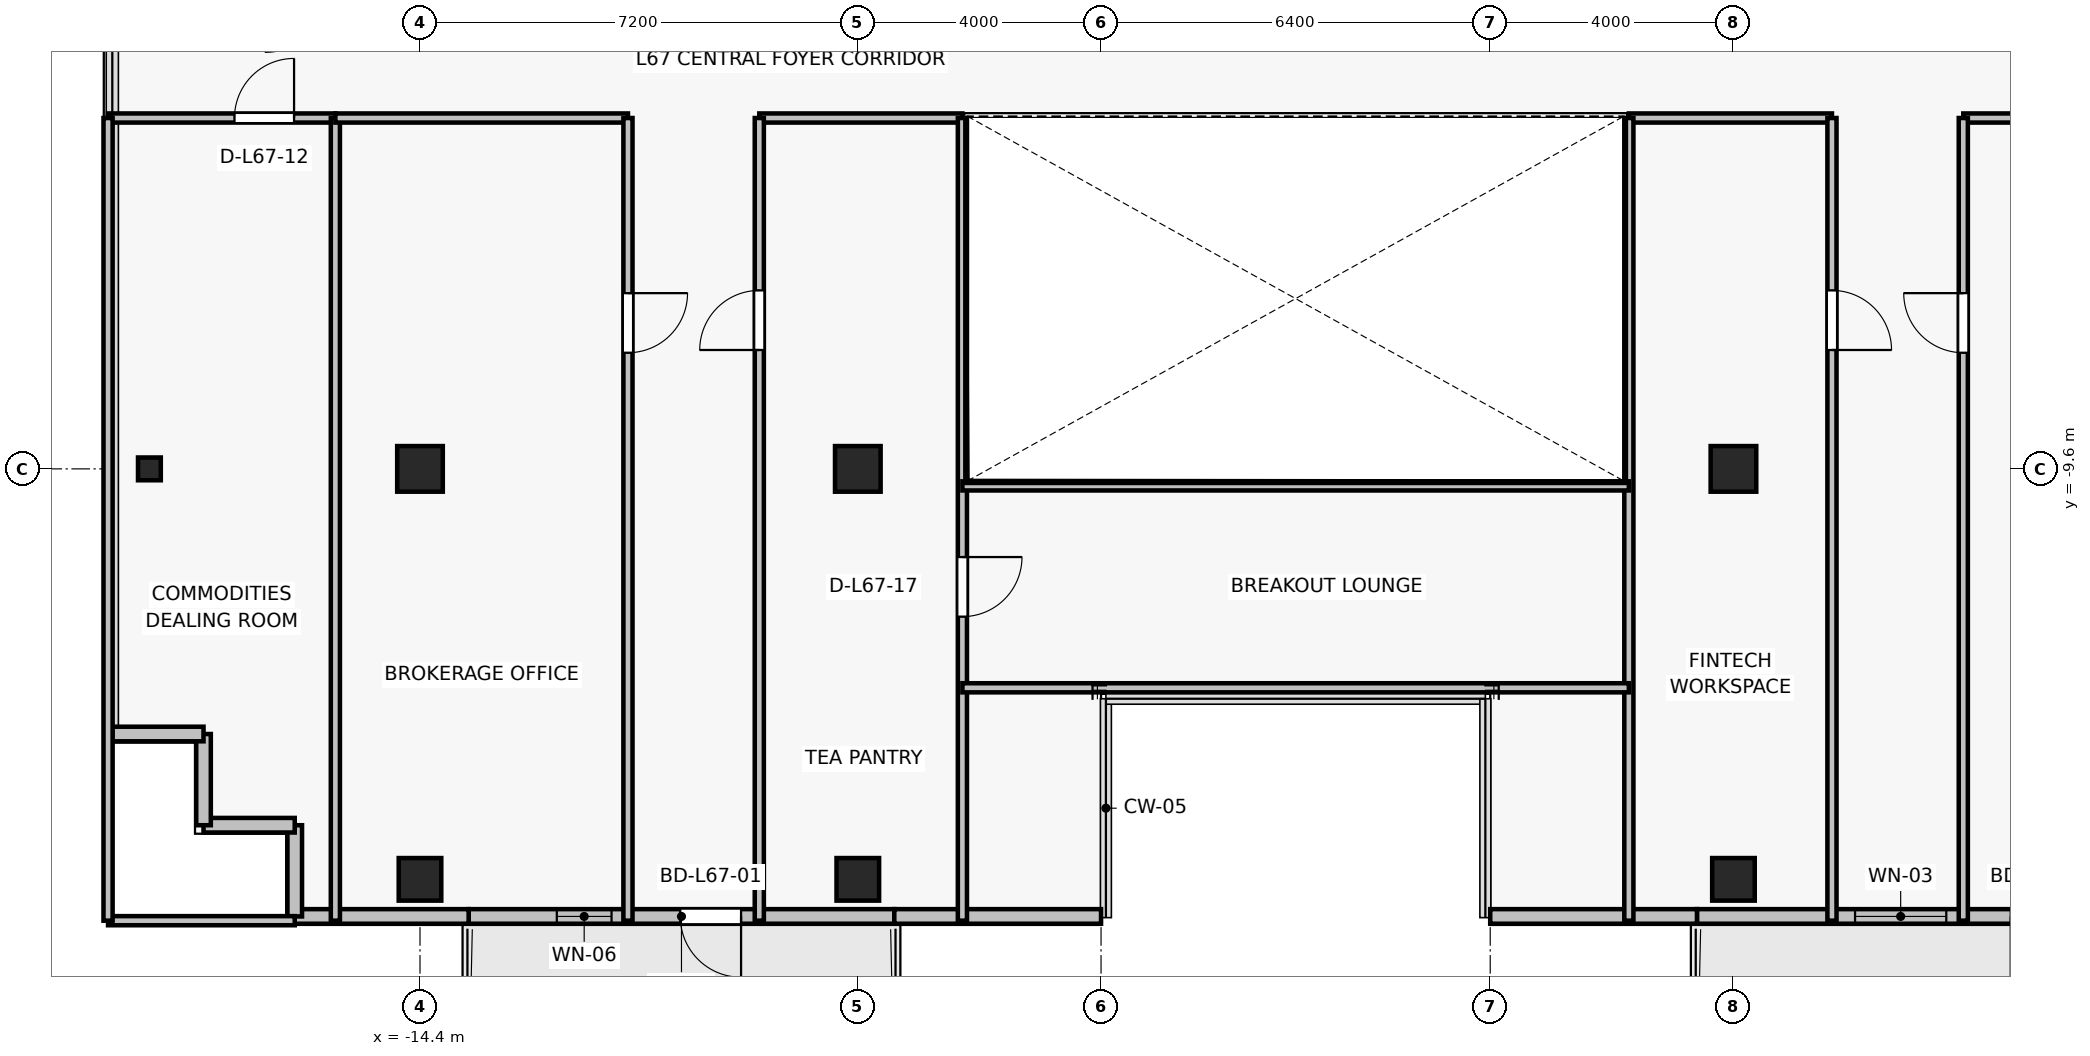
"""IFC4 building model, lengths in metres.
Left out: names, types, materials, properties, quantities, classifications, styles, units other than length and angle.
Written with IfcOpenShell. Run it as: python <this file> out.ifc"""

import sys

from ifc_helpers import new_model, si_unit, direction, frame, frame_2d, origin, origin_2d, place, context, subcontext, project, spatial, rectangle, i_section, extrude, source, transform, mapped, element, fill, save


model = new_model("IFC4")
c1 = context("Model", 3, precision=1e-05, world=origin(), true_north=direction((0.0, 1.0)))
c2 = subcontext(c1, "Body", "Model", "MODEL_VIEW")
j1 = project(units=[si_unit("LENGTHUNIT", "METRE"), si_unit("PLANEANGLEUNIT", "RADIAN")], contexts=[c1])
p1 = place(None, origin())
s1 = spatial("IfcSite", under=j1, at=p1, CompositionType="ELEMENT")
p2 = place(p1, origin())
s2 = spatial("IfcBuilding", under=s1, at=p2, CompositionType="ELEMENT")
p3 = place(p2, frame((0.0, 0.0, 238.6)))
s3 = spatial("IfcBuildingStorey", under=s2, at=p3, CompositionType="ELEMENT", Elevation=238.6)
for number, where, z_axis, x_axis in (
    (1, (-14.4, -9.6, 0.0), (0.0, 0.0, 1.0), (1.0, 0.0, 0.0)),
    (2, (-7.2, -9.6, 0.0), (0.0, 0.0, 1.0), (1.0, 0.0, 0.0)),
    (3, (7.2, -9.6, 0.0), (0.0, 0.0, 1.0), (1.0, 0.0, 0.0)),
):
    element("IfcColumn", number, at=place(p3, frame(where, z_axis=z_axis, x_axis=x_axis)), inside=s3, PredefinedType="COLUMN", context=c2, shape_type="SweptSolid", body=[
        extrude(rectangle(XDim=0.75, YDim=0.75, at=origin_2d()), origin(), (0.0, 0.0, 1.0), 3.3),
    ])
for number, where, z_axis, x_axis in (
    (4, (-14.4, -16.35, 0.0), (0.0, 0.0, 1.0), (1.0, 0.0, 0.0)),
    (5, (-7.2, -16.35, 0.0), (0.0, 0.0, 1.0), (1.0, 0.0, 0.0)),
    (6, (7.2, -16.35, 0.0), (0.0, 0.0, 1.0), (1.0, 0.0, 0.0)),
):
    element("IfcColumn", number, at=place(p3, frame(where, z_axis=z_axis, x_axis=x_axis)), inside=s3, PredefinedType="COLUMN", context=c2, shape_type="SweptSolid", body=[
        extrude(rectangle(XDim=0.7, YDim=0.7, at=origin_2d()), origin(), (0.0, 0.0, 1.0), 3.3),
    ])
p4 = place(p3, frame((-18.85, -9.6, 0.0), z_axis=(0.0, 0.0, 1.0), x_axis=(1.0, 0.0, 0.0)))
e7 = element("IfcColumn", 7, at=p4, inside=s3, PredefinedType="COLUMN", context=c2, shape_type="SweptSolid", body=[
    extrude(i_section(OverallWidth=0.375, OverallDepth=0.375, WebThickness=0.017, FlangeThickness=0.027, FilletRadius=0.015, at=origin_2d()), origin(), (0.0, 0.0, 1.0), 3.3),
])
p5 = place(p3, frame((-6.6, -16.96, 0.0), z_axis=(0.0, 0.0, 1.0), x_axis=(-1.0, 0.0, 0.0)))
e8 = element("IfcWall", 8, at=p5, inside=s3, PredefinedType="SOLIDWALL", context=c2, shape_type="SweptSolid", body=[
    extrude(rectangle(XDim=7.0, YDim=0.24, at=frame_2d((3.5, 0.0))), origin(), (0.0, 0.0, 1.0), 2.665),
])
p6 = place(p5, frame((2.52, 0.0, 0.0)))
e9 = element("IfcOpeningElement", 9, at=p6, cuts=e8, PredefinedType="OPENING", context=c2, shape_type="SweptSolid", body=[
    extrude(rectangle(XDim=1.0, YDim=2.2, at=frame_2d((0.5, 1.1))), frame((0.0, 0.13, 0.0), z_axis=(0.0, -1.0, 0.0), x_axis=(1.0, 0.0, 0.0)), (0.0, 0.0, 1.0), 0.26),
])
p7 = place(p5, frame((4.65, 0.0, 0.85)))
e10 = element("IfcOpeningElement", 10, at=p7, cuts=e8, PredefinedType="OPENING", context=c2, shape_type="SweptSolid", body=[
    extrude(rectangle(XDim=0.9, YDim=1.35, at=frame_2d((0.45, 0.675))), frame((0.0, 0.13, 0.0), z_axis=(0.0, -1.0, 0.0), x_axis=(1.0, 0.0, 0.0)), (0.0, 0.0, 1.0), 0.26),
])
p8 = place(p3, frame((13.6, -16.96, 0.0), z_axis=(0.0, 0.0, 1.0), x_axis=(-1.0, 0.0, 0.0)))
e11 = element("IfcWall", 11, at=p8, inside=s3, PredefinedType="SOLIDWALL", context=c2, shape_type="SweptSolid", body=[
    extrude(rectangle(XDim=7.0, YDim=0.24, at=frame_2d((3.5, 0.0))), origin(), (0.0, 0.0, 1.0), 2.665),
])
p9 = place(p8, frame((0.84, 0.0, 0.0)))
e12 = element("IfcOpeningElement", 12, at=p9, cuts=e11, PredefinedType="OPENING", context=c2, shape_type="SweptSolid", body=[
    extrude(rectangle(XDim=1.0, YDim=2.2, at=frame_2d((0.5, 1.1))), frame((0.0, 0.13, 0.0), z_axis=(0.0, -1.0, 0.0), x_axis=(1.0, 0.0, 0.0)), (0.0, 0.0, 1.0), 0.26),
])
p10 = place(p8, frame((2.9, 0.0, 0.85)))
e13 = element("IfcOpeningElement", 13, at=p10, cuts=e11, PredefinedType="OPENING", context=c2, shape_type="SweptSolid", body=[
    extrude(rectangle(XDim=1.5, YDim=1.6, at=frame_2d((0.75, 0.8))), frame((0.0, 0.13, 0.0), z_axis=(0.0, -1.0, 0.0), x_axis=(1.0, 0.0, 0.0)), (0.0, 0.0, 1.0), 0.26),
])
for number, where, z_axis, x_axis in (
    (14, (3.2, -16.96, 0.0), (0.0, 0.0, 1.0), (1.0, 0.0, 0.0)),
    (15, (-6.6, -16.96, 0.0), (0.0, 0.0, 1.0), (1.0, 0.0, 0.0)),
):
    element("IfcWall", number, at=place(p3, frame(where, z_axis=z_axis, x_axis=x_axis)), inside=s3, PredefinedType="SOLIDWALL", context=c2, shape_type="SweptSolid", body=[
        extrude(rectangle(XDim=3.4, YDim=0.24, at=frame_2d((1.7, 0.0))), origin(), (0.0, 0.0, 1.0), 3.075),
    ])
p11 = place(p3, frame((-16.46, -16.96, 0.0), z_axis=(0.0, 0.0, 1.0), x_axis=(1.0, 0.0, 0.0)))
e16 = element("IfcWall", 16, at=p11, inside=s3, PredefinedType="SOLIDWALL", context=c2, shape_type="SweptSolid", body=[
    extrude(rectangle(XDim=2.86, YDim=0.24, at=frame_2d((1.43, 0.0))), origin(), (0.0, 0.0, 1.0), 2.665),
])
for number, where, z_axis, x_axis in (
    (17, (-16.46, -15.46, 0.0), (0.0, 0.0, 1.0), (0.0, -1.0, 0.0)),
    (18, (-17.96, -15.46, 0.0), (0.0, 0.0, 1.0), (1.0, 0.0, 0.0)),
    (19, (-17.96, -13.96, 0.0), (0.0, 0.0, 1.0), (0.0, -1.0, 0.0)),
    (20, (-19.46, -13.96, 0.0), (0.0, 0.0, 1.0), (1.0, 0.0, 0.0)),
):
    element("IfcWall", number, at=place(p3, frame(where, z_axis=z_axis, x_axis=x_axis)), inside=s3, PredefinedType="SOLIDWALL", context=c2, shape_type="SweptSolid", body=[
        extrude(rectangle(XDim=1.5, YDim=0.24, at=frame_2d((0.75, 0.0))), origin(), (0.0, 0.0, 1.0), 3.075),
    ])
p12 = place(p3, frame((-16.46, -17.03, 0.0), z_axis=(0.0, 0.0, 1.0), x_axis=(-1.0, 0.0, 0.0)))
e21 = element("IfcWall", 21, at=p12, inside=s3, PredefinedType="PARTITIONING", context=c2, shape_type="SweptSolid", body=[
    extrude(rectangle(XDim=3.07, YDim=0.15, at=frame_2d((1.535, 0.0))), origin(), (0.0, 0.0, 1.0), 3.075),
])
p13 = place(p3, frame((-19.53, -3.83, 0.0), z_axis=(0.0, 0.0, 1.0), x_axis=(1.0, 0.0, 0.0)))
e22 = element("IfcWall", 22, at=p13, inside=s3, PredefinedType="PARTITIONING", context=c2, shape_type="SweptSolid", body=[
    extrude(rectangle(XDim=3.738, YDim=0.15, at=frame_2d((1.869, 0.0))), origin(), (0.0, 0.0, 1.0), 2.765),
])
p14 = place(p13, frame((2.079, 0.0, 0.0)))
e23 = element("IfcOpeningElement", 23, at=p14, cuts=e22, PredefinedType="OPENING", context=c2, shape_type="SweptSolid", body=[
    extrude(rectangle(XDim=0.98, YDim=2.15, at=frame_2d((0.49, 1.075))), frame((0.0, 0.085, 0.0), z_axis=(0.0, -1.0, 0.0), x_axis=(1.0, 0.0, 0.0)), (0.0, 0.0, 1.0), 0.17),
])
p15 = place(p3, frame((-19.53, -17.03, 0.0), z_axis=(0.0, 0.0, 1.0), x_axis=(0.0, 1.0, 0.0)))
e24 = element("IfcWall", 24, at=p15, inside=s3, PredefinedType="PARTITIONING", context=c2, shape_type="SweptSolid", body=[
    extrude(rectangle(XDim=13.2, YDim=0.15, at=frame_2d((6.6, 0.0))), origin(), (0.0, 0.0, 1.0), 2.665),
])
p16 = place(p3, frame((-15.792, -3.83, 0.0), z_axis=(0.0, 0.0, 1.0), x_axis=(0.0, -1.0, 0.0)))
e25 = element("IfcWall", 25, at=p16, inside=s3, PredefinedType="PARTITIONING", context=c2, shape_type="SweptSolid", body=[
    extrude(rectangle(XDim=13.2, YDim=0.15, at=frame_2d((6.6, 0.0))), origin(), (0.0, 0.0, 1.0), 2.615),
])
p17 = place(p3, frame((-15.792, -3.83, 0.0), z_axis=(0.0, 0.0, 1.0), x_axis=(1.0, 0.0, 0.0)))
e26 = element("IfcWall", 26, at=p17, inside=s3, PredefinedType="PARTITIONING", context=c2, shape_type="SweptSolid", body=[
    extrude(rectangle(XDim=4.812, YDim=0.15, at=frame_2d((2.406, 0.0))), origin(), (0.0, 0.0, 1.0), 2.615),
])
p18 = place(p3, frame((-10.98, -3.83, 0.0), z_axis=(0.0, 0.0, 1.0), x_axis=(0.0, -1.0, 0.0)))
e27 = element("IfcWall", 27, at=p18, inside=s3, PredefinedType="PARTITIONING", context=c2, shape_type="SweptSolid", body=[
    extrude(rectangle(XDim=13.2, YDim=0.15, at=frame_2d((6.6, 0.0))), origin(), (0.0, 0.0, 1.0), 2.615),
])
p19 = place(p18, frame((2.88, 0.0, 0.0)))
e28 = element("IfcOpeningElement", 28, at=p19, cuts=e27, PredefinedType="OPENING", context=c2, shape_type="SweptSolid", body=[
    extrude(rectangle(XDim=0.98, YDim=2.15, at=frame_2d((0.49, 1.075))), frame((0.0, 0.085, 0.0), z_axis=(0.0, -1.0, 0.0), x_axis=(1.0, 0.0, 0.0)), (0.0, 0.0, 1.0), 0.17),
])
p20 = place(p3, frame((10.98, -3.83, 0.0), z_axis=(0.0, 0.0, 1.0), x_axis=(1.0, 0.0, 0.0)))
e29 = element("IfcWall", 29, at=p20, inside=s3, PredefinedType="PARTITIONING", context=c2, shape_type="SweptSolid", body=[
    extrude(rectangle(XDim=12.55, YDim=0.15, at=frame_2d((6.275, 0.0))), origin(), (0.0, 0.0, 1.0), 2.615),
])
p21 = place(p3, frame((10.98, -17.03, 0.0), z_axis=(0.0, 0.0, 1.0), x_axis=(0.0, 1.0, 0.0)))
e30 = element("IfcWall", 30, at=p21, inside=s3, PredefinedType="PARTITIONING", context=c2, shape_type="SweptSolid", body=[
    extrude(rectangle(XDim=13.2, YDim=0.15, at=frame_2d((6.6, 0.0))), origin(), (0.0, 0.0, 1.0), 2.615),
])
p22 = place(p21, frame((9.34, 0.0, 0.0)))
e31 = element("IfcOpeningElement", 31, at=p22, cuts=e30, PredefinedType="OPENING", context=c2, shape_type="SweptSolid", body=[
    extrude(rectangle(XDim=0.98, YDim=2.15, at=frame_2d((0.49, 1.075))), frame((0.0, 0.085, 0.0), z_axis=(0.0, -1.0, 0.0), x_axis=(1.0, 0.0, 0.0)), (0.0, 0.0, 1.0), 0.17),
])
p23 = place(p3, frame((-8.82, -3.83, 0.0), z_axis=(0.0, 0.0, 1.0), x_axis=(1.0, 0.0, 0.0)))
e32 = element("IfcWall", 32, at=p23, inside=s3, PredefinedType="PARTITIONING", context=c2, shape_type="SweptSolid", body=[
    extrude(rectangle(XDim=3.34, YDim=0.15, at=frame_2d((1.67, 0.0))), origin(), (0.0, 0.0, 1.0), 2.615),
])
p24 = place(p3, frame((-8.82, -17.03, 0.0), z_axis=(0.0, 0.0, 1.0), x_axis=(0.0, 1.0, 0.0)))
e33 = element("IfcWall", 33, at=p24, inside=s3, PredefinedType="PARTITIONING", context=c2, shape_type="SweptSolid", body=[
    extrude(rectangle(XDim=13.2, YDim=0.15, at=frame_2d((6.6, 0.0))), origin(), (0.0, 0.0, 1.0), 2.615),
])
p25 = place(p24, frame((9.385, 0.0, 0.0)))
e34 = element("IfcOpeningElement", 34, at=p25, cuts=e33, PredefinedType="OPENING", context=c2, shape_type="SweptSolid", body=[
    extrude(rectangle(XDim=0.98, YDim=2.15, at=frame_2d((0.49, 1.075))), frame((0.0, 0.085, 0.0), z_axis=(0.0, -1.0, 0.0), x_axis=(1.0, 0.0, 0.0)), (0.0, 0.0, 1.0), 0.17),
])
p26 = place(p3, frame((-5.48, -3.83, 0.0), z_axis=(0.0, 0.0, 1.0), x_axis=(0.0, -1.0, 0.0)))
e35 = element("IfcWall", 35, at=p26, inside=s3, PredefinedType="PARTITIONING", context=c2, shape_type="SweptSolid", body=[
    extrude(rectangle(XDim=13.2, YDim=0.15, at=frame_2d((6.6, 0.0))), origin(), (0.0, 0.0, 1.0), 2.615),
])
p27 = place(p26, frame((7.22, 0.0, 0.0)))
e36 = element("IfcOpeningElement", 36, at=p27, cuts=e35, PredefinedType="OPENING", context=c2, shape_type="SweptSolid", body=[
    extrude(rectangle(XDim=0.98, YDim=2.15, at=frame_2d((0.49, 1.075))), frame((0.0, 0.085, 0.0), z_axis=(0.0, -1.0, 0.0), x_axis=(1.0, 0.0, 0.0)), (0.0, 0.0, 1.0), 0.17),
])
p28 = place(p3, frame((5.48, -3.83, 0.0), z_axis=(0.0, 0.0, 1.0), x_axis=(1.0, 0.0, 0.0)))
e37 = element("IfcWall", 37, at=p28, inside=s3, PredefinedType="PARTITIONING", context=c2, shape_type="SweptSolid", body=[
    extrude(rectangle(XDim=3.34, YDim=0.15, at=frame_2d((1.67, 0.0))), origin(), (0.0, 0.0, 1.0), 2.615),
])
p29 = place(p3, frame((5.48, -17.03, 0.0), z_axis=(0.0, 0.0, 1.0), x_axis=(0.0, 1.0, 0.0)))
e38 = element("IfcWall", 38, at=p29, inside=s3, PredefinedType="PARTITIONING", context=c2, shape_type="SweptSolid", body=[
    extrude(rectangle(XDim=13.2, YDim=0.15, at=frame_2d((6.6, 0.0))), origin(), (0.0, 0.0, 1.0), 2.615),
])
p30 = place(p3, frame((8.82, -3.83, 0.0), z_axis=(0.0, 0.0, 1.0), x_axis=(0.0, -1.0, 0.0)))
e39 = element("IfcWall", 39, at=p30, inside=s3, PredefinedType="PARTITIONING", context=c2, shape_type="SweptSolid", body=[
    extrude(rectangle(XDim=13.2, YDim=0.15, at=frame_2d((6.6, 0.0))), origin(), (0.0, 0.0, 1.0), 2.615),
])
p31 = place(p30, frame((2.835, 0.0, 0.0)))
e40 = element("IfcOpeningElement", 40, at=p31, cuts=e39, PredefinedType="OPENING", context=c2, shape_type="SweptSolid", body=[
    extrude(rectangle(XDim=0.98, YDim=2.15, at=frame_2d((0.49, 1.075))), frame((0.0, 0.085, 0.0), z_axis=(0.0, -1.0, 0.0), x_axis=(1.0, 0.0, 0.0)), (0.0, 0.0, 1.0), 0.17),
])
p32 = place(p3, frame((5.48, -13.2, 0.0), z_axis=(0.0, 0.0, 1.0), x_axis=(-1.0, 0.0, 0.0)))
e41 = element("IfcWall", 41, at=p32, inside=s3, PredefinedType="PARTITIONING", context=c2, shape_type="SweptSolid", body=[
    extrude(rectangle(XDim=10.96, YDim=0.15, at=frame_2d((5.48, 0.0))), origin(), (0.0, 0.0, 1.0), 2.765),
])
p33 = place(p3, frame((-5.48, -9.88, 0.0), z_axis=(0.0, 0.0, 1.0), x_axis=(1.0, 0.0, 0.0)))
e42 = element("IfcWall", 42, at=p33, inside=s3, PredefinedType="PARTITIONING", context=c2, shape_type="SweptSolid", body=[
    extrude(rectangle(XDim=10.96, YDim=0.15, at=frame_2d((5.48, 0.0))), origin(), (0.0, 0.0, 1.0), 2.615),
])
m1 = source(origin(), c2, "Body", "SweptSolid", [
    extrude(rectangle(XDim=1.0, YDim=2.2, at=frame_2d((0.5, 1.1))), frame((0.0, 0.025, 0.0), z_axis=(0.0, -1.0, 0.0), x_axis=(1.0, 0.0, 0.0)), (0.0, 0.0, 1.0), 0.05),
])
p34 = place(p6, origin())
e43 = element("IfcDoor", 43, at=p34, inside=s3, OperationType="SINGLE_SWING_LEFT", PredefinedType="DOOR", context=c2, shape_type="MappedRepresentation", body=[
    mapped(m1, transform((0.0, 0.0, 0.0), x_axis=(1.0, 0.0, 0.0), y_axis=(0.0, 1.0, 0.0), z_axis=(0.0, 0.0, 1.0), scale=1.0)),
])
fill(e9, e43)
m2 = source(origin(), c2, "Body", "SweptSolid", [
    extrude(rectangle(XDim=0.9, YDim=1.35, at=frame_2d((0.45, 0.675))), frame((0.0, 0.03, 0.0), z_axis=(0.0, -1.0, 0.0), x_axis=(1.0, 0.0, 0.0)), (0.0, 0.0, 1.0), 0.06),
])
p35 = place(p7, origin())
e44 = element("IfcWindow", 44, at=p35, inside=s3, PartitioningType="SINGLE_PANEL", PredefinedType="WINDOW", context=c2, shape_type="MappedRepresentation", body=[
    mapped(m2, transform((0.0, 0.0, 0.0), x_axis=(1.0, 0.0, 0.0), y_axis=(0.0, 1.0, 0.0), z_axis=(0.0, 0.0, 1.0), scale=1.0)),
])
fill(e10, e44)
m3 = source(origin(), c2, "Body", "SweptSolid", [
    extrude(rectangle(XDim=1.5, YDim=1.6, at=frame_2d((0.75, 0.8))), frame((0.0, 0.03, 0.0), z_axis=(0.0, -1.0, 0.0), x_axis=(1.0, 0.0, 0.0)), (0.0, 0.0, 1.0), 0.06),
])
p36 = place(p10, origin())
e45 = element("IfcWindow", 45, at=p36, inside=s3, PartitioningType="SINGLE_PANEL", PredefinedType="WINDOW", context=c2, shape_type="MappedRepresentation", body=[
    mapped(m3, transform((0.0, 0.0, 0.0), x_axis=(1.0, 0.0, 0.0), y_axis=(0.0, 1.0, 0.0), z_axis=(0.0, 0.0, 1.0), scale=1.0)),
])
fill(e13, e45)
m4 = source(origin(), c2, "Body", "SweptSolid", [
    extrude(rectangle(XDim=0.98, YDim=2.15, at=frame_2d((0.49, 1.075))), frame((0.0, 0.025, 0.0), z_axis=(0.0, -1.0, 0.0), x_axis=(1.0, 0.0, 0.0)), (0.0, 0.0, 1.0), 0.05),
])
p37 = place(p14, origin())
e46 = element("IfcDoor", 46, at=p37, inside=s3, OperationType="SINGLE_SWING_RIGHT", PredefinedType="DOOR", context=c2, shape_type="MappedRepresentation", body=[
    mapped(m4, transform((0.0, 0.0, 0.0), x_axis=(1.0, 0.0, 0.0), y_axis=(0.0, 1.0, 0.0), z_axis=(0.0, 0.0, 1.0), scale=1.0)),
])
fill(e23, e46)
p38 = place(p19, origin())
e47 = element("IfcDoor", 47, at=p38, inside=s3, OperationType="SINGLE_SWING_LEFT", PredefinedType="DOOR", context=c2, shape_type="MappedRepresentation", body=[
    mapped(m4, transform((0.0, 0.0, 0.0), x_axis=(1.0, 0.0, 0.0), y_axis=(0.0, 1.0, 0.0), z_axis=(0.0, 0.0, 1.0), scale=1.0)),
])
fill(e28, e47)
p39 = place(p22, origin())
e48 = element("IfcDoor", 48, at=p39, inside=s3, OperationType="SINGLE_SWING_RIGHT", PredefinedType="DOOR", context=c2, shape_type="MappedRepresentation", body=[
    mapped(m4, transform((0.0, 0.0, 0.0), x_axis=(1.0, 0.0, 0.0), y_axis=(0.0, 1.0, 0.0), z_axis=(0.0, 0.0, 1.0), scale=1.0)),
])
fill(e31, e48)
p40 = place(p25, origin())
e49 = element("IfcDoor", 49, at=p40, inside=s3, OperationType="SINGLE_SWING_LEFT", PredefinedType="DOOR", context=c2, shape_type="MappedRepresentation", body=[
    mapped(m4, transform((0.0, 0.0, 0.0), x_axis=(1.0, 0.0, 0.0), y_axis=(0.0, 1.0, 0.0), z_axis=(0.0, 0.0, 1.0), scale=1.0)),
])
fill(e34, e49)
p41 = place(p31, origin())
e50 = element("IfcDoor", 50, at=p41, inside=s3, OperationType="SINGLE_SWING_RIGHT", PredefinedType="DOOR", context=c2, shape_type="MappedRepresentation", body=[
    mapped(m4, transform((0.0, 0.0, 0.0), x_axis=(1.0, 0.0, 0.0), y_axis=(0.0, 1.0, 0.0), z_axis=(0.0, 0.0, 1.0), scale=1.0)),
])
fill(e40, e50)
p42 = place(p27, origin())
e51 = element("IfcDoor", 51, at=p42, inside=s3, OperationType="SINGLE_SWING_LEFT", PredefinedType="DOOR", context=c2, shape_type="MappedRepresentation", body=[
    mapped(m4, transform((0.0, 0.0, 0.0), x_axis=(1.0, 0.0, 0.0), y_axis=(0.0, 1.0, 0.0), z_axis=(0.0, 0.0, 1.0), scale=1.0)),
])
fill(e36, e51)
save(model, sys.argv[1])
